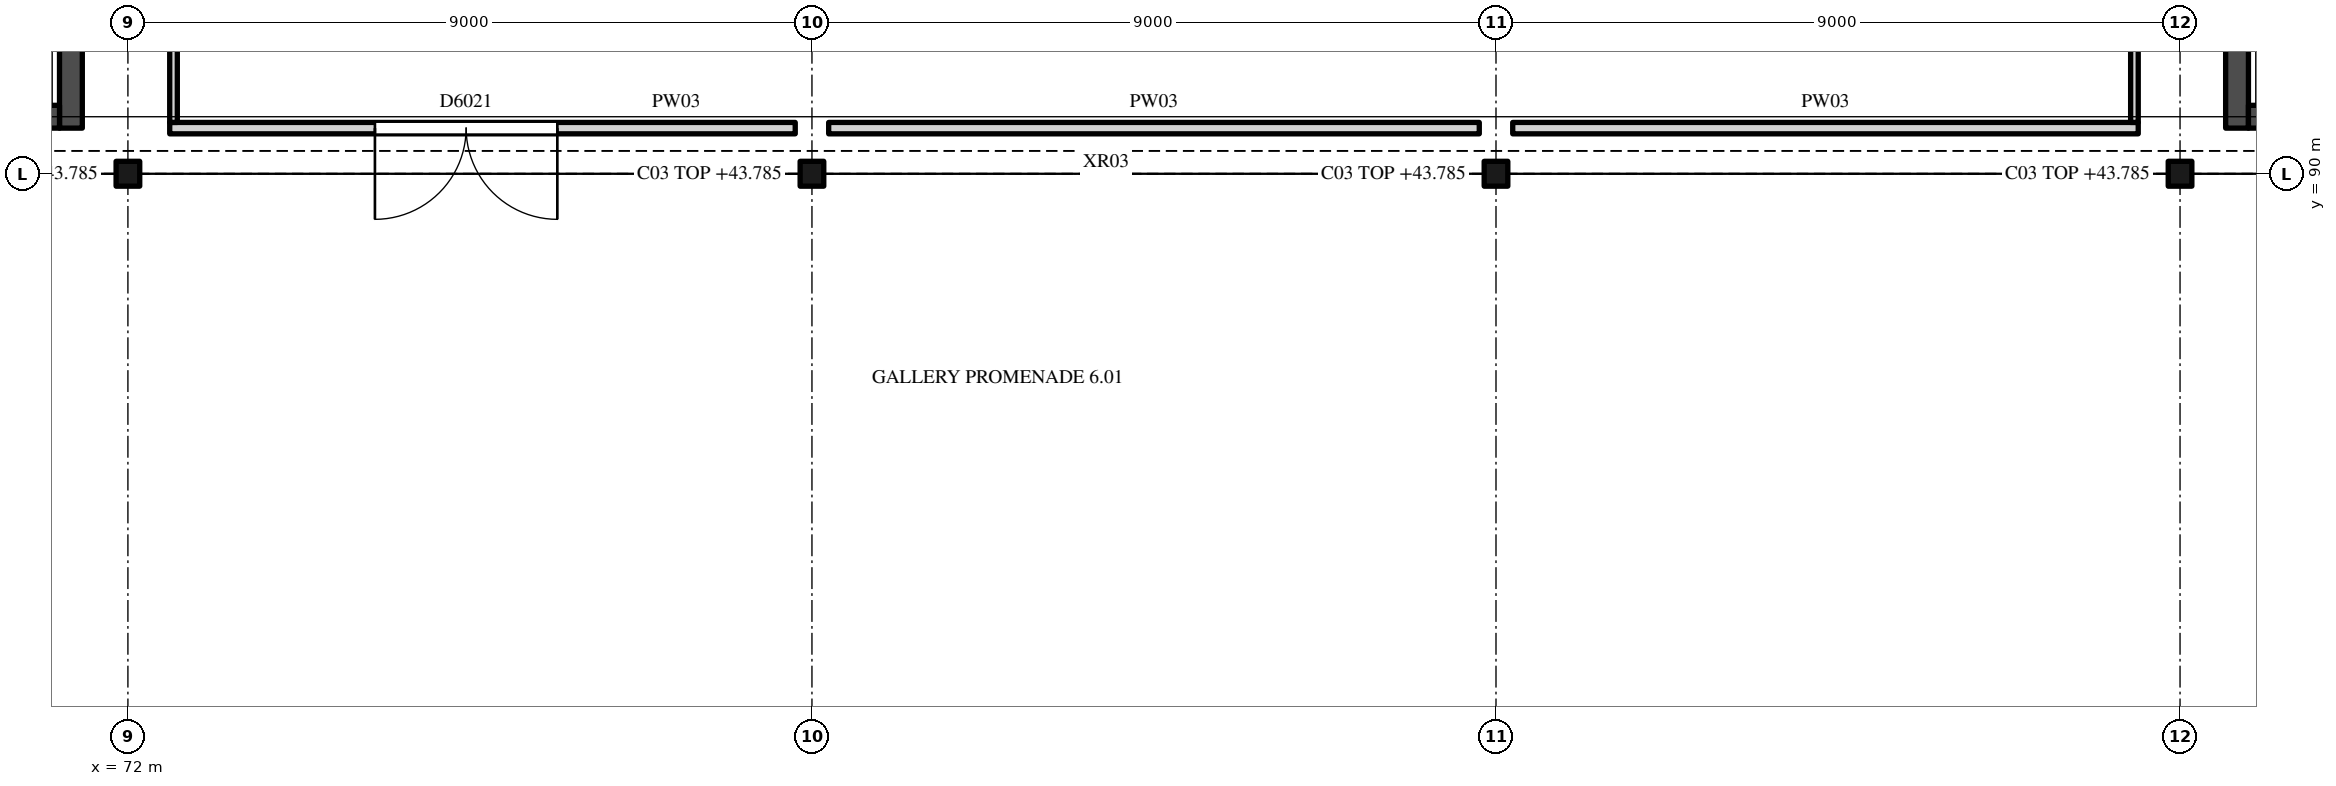
"""IFC4 building model, lengths in metres.
Left out: names, types, materials, properties, quantities, classifications, styles, units other than length and angle.
Written with IfcOpenShell. Run it as: python <this file> out.ifc"""

import sys

from ifc_helpers import new_model, si_unit, direction, frame, frame_2d, origin, origin_2d, place, context, subcontext, project, spatial, polyline, rectangle, i_section, outline, extrude, element, fill, save


model = new_model("IFC4")
c1 = context("Model", 3, precision=1e-05, world=origin(), true_north=direction((0.0, 1.0)))
c2 = subcontext(c1, "Body", "Model", "MODEL_VIEW")
j1 = project(units=[si_unit("LENGTHUNIT", "METRE"), si_unit("PLANEANGLEUNIT", "RADIAN")], contexts=[c1])
p1 = place(None, origin())
s1 = spatial("IfcSite", under=j1, at=p1, CompositionType="ELEMENT")
p2 = place(p1, origin())
s2 = spatial("IfcBuilding", under=s1, at=p2, CompositionType="ELEMENT")
p3 = place(p2, frame((0.0, 0.0, 36.0)))
s3 = spatial("IfcBuildingStorey", under=s2, at=p3, CompositionType="ELEMENT", Elevation=36.0)
for number, where, z_axis, x_axis in (
    (1, (72.0, 90.0, 0.0), (0.0, 0.0, 1.0), (1.0, 0.0, 0.0)),
    (2, (81.0, 90.0, 0.0), (0.0, 0.0, 1.0), (1.0, 0.0, 0.0)),
    (3, (90.0, 90.0, 0.0), (0.0, 0.0, 1.0), (1.0, 0.0, 0.0)),
    (4, (99.0, 90.0, 0.0), (0.0, 0.0, 1.0), (1.0, 0.0, 0.0)),
):
    element("IfcColumn", number, at=place(p3, frame(where, z_axis=z_axis, x_axis=x_axis)), inside=s3, PredefinedType="COLUMN", context=c2, shape_type="SweptSolid", body=[
        extrude(i_section(OverallWidth=0.311, OverallDepth=0.327, WebThickness=0.016, FlangeThickness=0.025, FilletRadius=0.017, at=origin_2d()), origin(), (0.0, 0.0, 1.0), 7.785),
    ])
p4 = place(p3, frame((71.25, 90.6, 0.0), z_axis=(0.0, 0.0, 1.0), x_axis=(0.0, 1.0, 0.0)))
e5 = element("IfcWall", 5, at=p4, inside=s3, PredefinedType="SHEAR", context=c2, shape_type="SweptSolid", body=[
    extrude(rectangle(XDim=3.6, YDim=0.3, at=frame_2d((1.8, 0.0))), origin(), (0.0, 0.0, 1.0), 8.405),
])
p5 = place(p3, frame((68.95, 90.75, 0.0), z_axis=(0.0, 0.0, 1.0), x_axis=(1.0, 0.0, 0.0)))
e6 = element("IfcWall", 6, at=p5, inside=s3, PredefinedType="SHEAR", context=c2, shape_type="SweptSolid", body=[
    extrude(outline(polyline([(0.0, 0.0), (2.15, 0.0), (2.15, 8.54), (1.881, 8.746), (1.075, 9.21), (0.806, 9.334), (0.0, 9.596), (0.0, 0.0)])), frame((0.0, 0.15, 0.0), z_axis=(0.0, -1.0, 0.0), x_axis=(1.0, 0.0, 0.0)), (0.0, 0.0, 1.0), 0.3),
])
p6 = place(p5, frame((0.6, 0.0, 0.0)))
e7 = element("IfcOpeningElement", 7, at=p6, cuts=e6, PredefinedType="OPENING", context=c2, shape_type="SweptSolid", body=[
    extrude(rectangle(XDim=1.1, YDim=2.1, at=frame_2d((0.55, 1.05))), frame((0.0, 0.16, 0.0), z_axis=(0.0, -1.0, 0.0), x_axis=(1.0, 0.0, 0.0)), (0.0, 0.0, 1.0), 0.32),
])
p7 = place(p3, frame((99.75, 90.6, 0.0), z_axis=(0.0, 0.0, 1.0), x_axis=(0.0, 1.0, 0.0)))
e8 = element("IfcWall", 8, at=p7, inside=s3, PredefinedType="SHEAR", context=c2, shape_type="SweptSolid", body=[
    extrude(rectangle(XDim=3.6, YDim=0.3, at=frame_2d((1.8, 0.0))), origin(), (0.0, 0.0, 1.0), 8.405),
])
p8 = place(p3, frame((99.9, 90.75, 0.0), z_axis=(0.0, 0.0, 1.0), x_axis=(1.0, 0.0, 0.0)))
e9 = element("IfcWall", 9, at=p8, inside=s3, PredefinedType="SHEAR", context=c2, shape_type="SweptSolid", body=[
    extrude(outline(polyline([(0.0, 0.0), (2.15, 0.0), (2.15, 9.596), (1.344, 9.334), (1.075, 9.21), (0.269, 8.746), (0.0, 8.54), (0.0, 0.0)])), frame((0.0, 0.15, 0.0), z_axis=(0.0, -1.0, 0.0), x_axis=(1.0, 0.0, 0.0)), (0.0, 0.0, 1.0), 0.3),
])
p9 = place(p8, frame((0.45, 0.0, 0.0)))
e10 = element("IfcOpeningElement", 10, at=p9, cuts=e9, PredefinedType="OPENING", context=c2, shape_type="SweptSolid", body=[
    extrude(rectangle(XDim=1.1, YDim=2.1, at=frame_2d((0.55, 1.05))), frame((0.0, 0.16, 0.0), z_axis=(0.0, -1.0, 0.0), x_axis=(1.0, 0.0, 0.0)), (0.0, 0.0, 1.0), 0.32),
])
p10 = place(p3, frame((54.156, 90.15, 7.8), z_axis=(0.0, 0.0, 1.0), x_axis=(1.0, 0.0, 0.0)))
e11 = element("IfcWall", 11, at=p10, inside=s3, PredefinedType="SOLIDWALL", context=c2, shape_type="SweptSolid", body=[
    extrude(outline(polyline([(0.0, 0.0), (62.689, 0.0), (62.689, 0.071), (61.785, 0.883), (60.725, 1.494), (59.561, 1.871), (58.344, 1.999), (57.128, 1.871), (55.964, 1.494), (54.904, 0.883), (53.844, 0.05), (52.785, 0.883), (51.725, 1.494), (50.561, 1.871), (49.344, 1.999), (48.128, 1.871), (46.964, 1.494), (45.904, 0.883), (44.844, 0.05), (43.785, 0.883), (42.725, 1.494), (41.561, 1.871), (40.344, 1.999), (39.128, 1.871), (37.964, 1.494), (36.904, 0.883), (35.844, 0.05), (34.785, 0.883), (33.725, 1.494), (32.561, 1.871), (31.344, 1.999), (30.128, 1.871), (28.964, 1.494), (27.904, 0.883), (26.844, 0.05), (25.785, 0.883), (24.725, 1.494), (23.561, 1.871), (22.344, 1.999), (21.128, 1.871), (19.964, 1.494), (18.904, 0.883), (17.844, 0.05), (16.785, 0.883), (15.725, 1.494), (14.561, 1.871), (13.344, 1.999), (12.128, 1.871), (10.964, 1.494), (9.904, 0.883), (8.844, 0.05), (7.785, 0.883), (6.725, 1.494), (5.561, 1.871), (4.344, 1.999), (3.128, 1.871), (1.964, 1.494), (0.904, 0.883), (0.0, 0.071), (0.0, 0.0)])), frame((0.0, 0.15, 0.0), z_axis=(0.0, -1.0, 0.0), x_axis=(1.0, 0.0, 0.0)), (0.0, 0.0, 1.0), 0.3),
])
p11 = place(p3, frame((72.55, 90.6, 0.0), z_axis=(0.0, 0.0, 1.0), x_axis=(1.0, 0.0, 0.0)))
e12 = element("IfcWall", 12, at=p11, inside=s3, PredefinedType="PARTITIONING", context=c2, shape_type="SweptSolid", body=[
    extrude(rectangle(XDim=8.23, YDim=0.15, at=frame_2d((4.115, 0.0))), origin(), (0.0, 0.0, 1.0), 7.731),
])
p12 = place(p11, frame((2.7, 0.0, 0.0)))
e13 = element("IfcOpeningElement", 13, at=p12, cuts=e12, PredefinedType="OPENING", context=c2, shape_type="SweptSolid", body=[
    extrude(rectangle(XDim=2.4, YDim=3.0, at=frame_2d((1.2, 1.5))), frame((0.0, 0.085, 0.0), z_axis=(0.0, -1.0, 0.0), x_axis=(1.0, 0.0, 0.0)), (0.0, 0.0, 1.0), 0.17),
])
p13 = place(p3, frame((81.22, 90.6, 0.0), z_axis=(0.0, 0.0, 1.0), x_axis=(1.0, 0.0, 0.0)))
e14 = element("IfcWall", 14, at=p13, inside=s3, PredefinedType="PARTITIONING", context=c2, shape_type="SweptSolid", body=[
    extrude(rectangle(XDim=8.56, YDim=0.15, at=frame_2d((4.28, 0.0))), origin(), (0.0, 0.0, 1.0), 7.731),
])
p14 = place(p3, frame((90.22, 90.6, 0.0), z_axis=(0.0, 0.0, 1.0), x_axis=(1.0, 0.0, 0.0)))
e15 = element("IfcWall", 15, at=p14, inside=s3, PredefinedType="PARTITIONING", context=c2, shape_type="SweptSolid", body=[
    extrude(rectangle(XDim=8.23, YDim=0.15, at=frame_2d((4.115, 0.0))), origin(), (0.0, 0.0, 1.0), 7.731),
])
for number, where, z_axis, x_axis in (
    (16, (72.6, 90.675, 0.0), (0.0, 0.0, 1.0), (0.0, 1.0, 0.0)),
    (17, (98.4, 90.675, 0.0), (0.0, 0.0, 1.0), (0.0, 1.0, 0.0)),
):
    element("IfcWall", number, at=place(p3, frame(where, z_axis=z_axis, x_axis=x_axis)), inside=s3, PredefinedType="PARTITIONING", context=c2, shape_type="SweptSolid", body=[
        extrude(rectangle(XDim=12.75, YDim=0.1, at=frame_2d((6.375, 0.0))), origin(), (0.0, 0.0, 1.0), 7.731),
    ])
p15 = place(p12, origin())
e18 = element("IfcDoor", 18, at=p15, inside=s3, OperationType="DOUBLE_DOOR_SINGLE_SWING", PredefinedType="DOOR", context=c2, shape_type="SweptSolid", body=[
    extrude(rectangle(XDim=2.4, YDim=3.0, at=frame_2d((1.2, 1.5))), frame((0.0, 0.025, 0.0), z_axis=(0.0, -1.0, 0.0), x_axis=(1.0, 0.0, 0.0)), (0.0, 0.0, 1.0), 0.05),
])
fill(e13, e18)
save(model, sys.argv[1])
